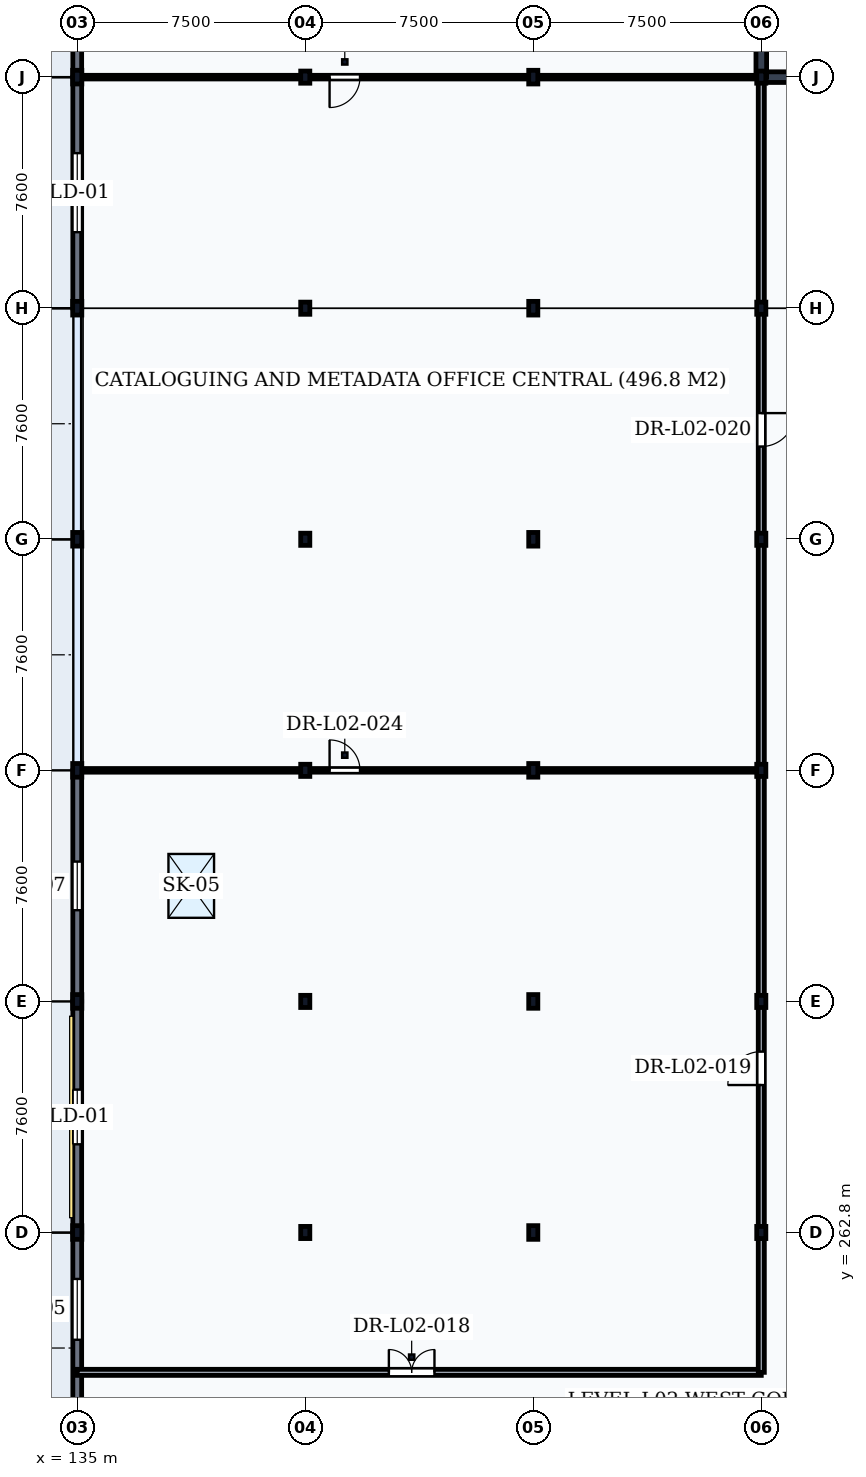
"""IFC4 building model, lengths in metres.
Left out: names, types, materials, properties, quantities, classifications, styles, units other than length and angle.
Written with IfcOpenShell. Run it as: python <this file> out.ifc"""

import sys

from ifc_helpers import new_model, si_unit, direction, frame, frame_2d, origin, origin_2d, place, context, subcontext, project, spatial, rectangle, i_section, extrude, element, fill, save


model = new_model("IFC4")
c1 = context("Model", 3, precision=1e-05, world=origin(), true_north=direction((0.0, 1.0)))
c2 = subcontext(c1, "Body", "Model", "MODEL_VIEW")
j1 = project(units=[si_unit("LENGTHUNIT", "METRE"), si_unit("PLANEANGLEUNIT", "RADIAN")], contexts=[c1])
p1 = place(None, origin())
s1 = spatial("IfcSite", under=j1, at=p1, CompositionType="ELEMENT")
p2 = place(p1, origin())
s2 = spatial("IfcBuilding", under=s1, at=p2, CompositionType="ELEMENT")
p3 = place(p2, frame((0.0, 0.0, 5.4)))
s3 = spatial("IfcBuildingStorey", under=s2, at=p3, CompositionType="ELEMENT", Elevation=5.4)
for number, where, z_axis, x_axis in (
    (1, (135.0, 262.8, 0.0), (0.0, 0.0, 1.0), (1.0, 0.0, 0.0)),
    (2, (135.0, 270.4, 0.0), (0.0, 0.0, 1.0), (1.0, 0.0, 0.0)),
    (3, (135.0, 278.0, 0.0), (0.0, 0.0, 1.0), (1.0, 0.0, 0.0)),
    (4, (135.0, 285.6, 0.0), (0.0, 0.0, 1.0), (1.0, 0.0, 0.0)),
    (5, (135.0, 293.2, 0.0), (0.0, 0.0, 1.0), (1.0, 0.0, 0.0)),
    (6, (135.0, 300.8, 0.0), (0.0, 0.0, 1.0), (1.0, 0.0, 0.0)),
):
    element("IfcColumn", number, at=place(p3, frame(where, z_axis=z_axis, x_axis=x_axis)), inside=s3, PredefinedType="COLUMN", context=c2, shape_type="SweptSolid", body=[
        extrude(i_section(OverallWidth=0.3, OverallDepth=0.45, WebThickness=0.014, FlangeThickness=0.026, FilletRadius=0.027, at=origin_2d()), origin(), (0.0, 0.0, 1.0), 5.1),
    ])
for number, where, z_axis, x_axis in (
    (7, (142.5, 262.8, 0.0), (0.0, 0.0, 1.0), (1.0, 0.0, 0.0)),
    (8, (142.5, 270.4, 0.0), (0.0, 0.0, 1.0), (1.0, 0.0, 0.0)),
    (9, (142.5, 278.0, 0.0), (0.0, 0.0, 1.0), (1.0, 0.0, 0.0)),
    (10, (142.5, 285.6, 0.0), (0.0, 0.0, 1.0), (1.0, 0.0, 0.0)),
    (11, (142.5, 293.2, 0.0), (0.0, 0.0, 1.0), (1.0, 0.0, 0.0)),
    (12, (142.5, 300.8, 0.0), (0.0, 0.0, 1.0), (1.0, 0.0, 0.0)),
):
    element("IfcColumn", number, at=place(p3, frame(where, z_axis=z_axis, x_axis=x_axis)), inside=s3, PredefinedType="COLUMN", context=c2, shape_type="SweptSolid", body=[
        extrude(i_section(OverallWidth=0.3, OverallDepth=0.4, WebThickness=0.013, FlangeThickness=0.024, FilletRadius=0.027, at=origin_2d()), origin(), (0.0, 0.0, 1.0), 5.1),
    ])
for number, where, z_axis, x_axis in (
    (13, (150.0, 262.8, 0.0), (0.0, 0.0, 1.0), (1.0, 0.0, 0.0)),
    (14, (150.0, 270.4, 0.0), (0.0, 0.0, 1.0), (1.0, 0.0, 0.0)),
    (15, (150.0, 278.0, 0.0), (0.0, 0.0, 1.0), (1.0, 0.0, 0.0)),
    (16, (150.0, 285.6, 0.0), (0.0, 0.0, 1.0), (1.0, 0.0, 0.0)),
    (17, (150.0, 293.2, 0.0), (0.0, 0.0, 1.0), (1.0, 0.0, 0.0)),
    (18, (150.0, 300.8, 0.0), (0.0, 0.0, 1.0), (1.0, 0.0, 0.0)),
):
    element("IfcColumn", number, at=place(p3, frame(where, z_axis=z_axis, x_axis=x_axis)), inside=s3, PredefinedType="COLUMN", context=c2, shape_type="SweptSolid", body=[
        extrude(i_section(OverallWidth=0.3, OverallDepth=0.45, WebThickness=0.014, FlangeThickness=0.026, FilletRadius=0.027, at=origin_2d()), origin(), (0.0, 0.0, 1.0), 5.1),
    ])
for number, where, z_axis, x_axis in (
    (19, (157.5, 262.8, 0.0), (0.0, 0.0, 1.0), (1.0, 0.0, 0.0)),
    (20, (157.5, 270.4, 0.0), (0.0, 0.0, 1.0), (1.0, 0.0, 0.0)),
    (21, (157.5, 278.0, 0.0), (0.0, 0.0, 1.0), (1.0, 0.0, 0.0)),
    (22, (157.5, 285.6, 0.0), (0.0, 0.0, 1.0), (1.0, 0.0, 0.0)),
    (23, (157.5, 293.2, 0.0), (0.0, 0.0, 1.0), (1.0, 0.0, 0.0)),
    (24, (157.5, 300.8, 0.0), (0.0, 0.0, 1.0), (1.0, 0.0, 0.0)),
):
    element("IfcColumn", number, at=place(p3, frame(where, z_axis=z_axis, x_axis=x_axis)), inside=s3, PredefinedType="COLUMN", context=c2, shape_type="SweptSolid", body=[
        extrude(i_section(OverallWidth=0.3, OverallDepth=0.4, WebThickness=0.013, FlangeThickness=0.024, FilletRadius=0.027, at=origin_2d()), origin(), (0.0, 0.0, 1.0), 5.1),
    ])
p4 = place(p3, frame((135.0, 255.206, 0.0), z_axis=(0.0, 0.0, 1.0), x_axis=(0.0, 1.0, 0.0)))
e25 = element("IfcWall", 25, at=p4, inside=s3, PredefinedType="SOLIDWALL", context=c2, shape_type="SweptSolid", body=[
    extrude(rectangle(XDim=7.588, YDim=0.29, at=frame_2d((3.794, 0.0))), origin(), (0.0, 0.0, 1.0), 4.578),
])
p5 = place(p4, frame((4.066, 0.0, 0.95)))
e26 = element("IfcOpeningElement", 26, at=p5, cuts=e25, PredefinedType="OPENING", context=c2, shape_type="SweptSolid", body=[
    extrude(rectangle(XDim=2.0, YDim=2.6, at=frame_2d((1.0, 1.3))), frame((0.0, 0.16, 0.0), z_axis=(0.0, -1.0, 0.0), x_axis=(1.0, 0.0, 0.0)), (0.0, 0.0, 1.0), 0.32),
])
p6 = place(p3, frame((135.0, 262.806, 0.0), z_axis=(0.0, 0.0, 1.0), x_axis=(0.0, 1.0, 0.0)))
e27 = element("IfcWall", 27, at=p6, inside=s3, PredefinedType="SOLIDWALL", context=c2, shape_type="SweptSolid", body=[
    extrude(rectangle(XDim=7.588, YDim=0.29, at=frame_2d((3.794, 0.0))), origin(), (0.0, 0.0, 1.0), 4.578),
])
p7 = place(p6, frame((2.894, 0.0, 0.95)))
e28 = element("IfcOpeningElement", 28, at=p7, cuts=e27, PredefinedType="OPENING", context=c2, shape_type="SweptSolid", body=[
    extrude(rectangle(XDim=1.8, YDim=2.6, at=frame_2d((0.9, 1.3))), frame((0.0, 0.16, 0.0), z_axis=(0.0, -1.0, 0.0), x_axis=(1.0, 0.0, 0.0)), (0.0, 0.0, 1.0), 0.32),
])
p8 = place(p3, frame((135.0, 270.406, 0.0), z_axis=(0.0, 0.0, 1.0), x_axis=(0.0, 1.0, 0.0)))
e29 = element("IfcWall", 29, at=p8, inside=s3, PredefinedType="SOLIDWALL", context=c2, shape_type="SweptSolid", body=[
    extrude(rectangle(XDim=7.588, YDim=0.29, at=frame_2d((3.794, 0.0))), origin(), (0.0, 0.0, 1.0), 4.578),
])
p9 = place(p8, frame((2.994, 0.0, 0.95)))
e30 = element("IfcOpeningElement", 30, at=p9, cuts=e29, PredefinedType="OPENING", context=c2, shape_type="SweptSolid", body=[
    extrude(rectangle(XDim=1.6, YDim=2.4, at=frame_2d((0.8, 1.2))), frame((0.0, 0.16, 0.0), z_axis=(0.0, -1.0, 0.0), x_axis=(1.0, 0.0, 0.0)), (0.0, 0.0, 1.0), 0.32),
])
p10 = place(p3, frame((135.0, 293.206, 0.0), z_axis=(0.0, 0.0, 1.0), x_axis=(0.0, 1.0, 0.0)))
e31 = element("IfcWall", 31, at=p10, inside=s3, PredefinedType="SOLIDWALL", context=c2, shape_type="SweptSolid", body=[
    extrude(rectangle(XDim=7.588, YDim=0.29, at=frame_2d((3.794, 0.0))), origin(), (0.0, 0.0, 1.0), 4.578),
])
p11 = place(p10, frame((2.494, 0.0, 0.95)))
e32 = element("IfcOpeningElement", 32, at=p11, cuts=e31, PredefinedType="OPENING", context=c2, shape_type="SweptSolid", body=[
    extrude(rectangle(XDim=2.6, YDim=3.0, at=frame_2d((1.3, 1.5))), frame((0.0, 0.16, 0.0), z_axis=(0.0, -1.0, 0.0), x_axis=(1.0, 0.0, 0.0)), (0.0, 0.0, 1.0), 0.32),
])
p12 = place(p3, frame((135.0, 300.806, 0.0), z_axis=(0.0, 0.0, 1.0), x_axis=(0.0, 1.0, 0.0)))
e33 = element("IfcWall", 33, at=p12, inside=s3, PredefinedType="SOLIDWALL", context=c2, shape_type="SweptSolid", body=[
    extrude(rectangle(XDim=7.588, YDim=0.29, at=frame_2d((3.794, 0.0))), origin(), (0.0, 0.0, 1.0), 4.578),
])
p13 = place(p12, frame((2.594, 0.0, 0.95)))
e34 = element("IfcOpeningElement", 34, at=p13, cuts=e33, PredefinedType="OPENING", context=c2, shape_type="SweptSolid", body=[
    extrude(rectangle(XDim=2.4, YDim=2.8, at=frame_2d((1.2, 1.4))), frame((0.0, 0.16, 0.0), z_axis=(0.0, -1.0, 0.0), x_axis=(1.0, 0.0, 0.0)), (0.0, 0.0, 1.0), 0.32),
])
p14 = place(p3, frame((135.1, 248.6, 5.1), z_axis=(0.0, 0.0, 1.0), x_axis=(0.0, 1.0, 0.0)))
e35 = element("IfcWall", 35, at=p14, inside=s3, PredefinedType="PARAPET", context=c2, shape_type="SweptSolid", body=[
    extrude(rectangle(XDim=89.2, YDim=0.18, at=frame_2d((44.6, 0.0))), origin(), (0.0, 0.0, 1.0), 1.2),
])
p15 = place(p3, frame((157.5, 300.8, 0.0), z_axis=(0.0, 0.0, 1.0), x_axis=(1.0, 0.0, 0.0)))
e36 = element("IfcWall", 36, at=p15, inside=s3, PredefinedType="SHEAR", context=c2, shape_type="SweptSolid", body=[
    extrude(rectangle(XDim=7.5, YDim=0.35, at=frame_2d((3.75, 0.0))), origin(), (0.0, 0.0, 1.0), 4.86),
])
p16 = place(p3, frame((157.5, 300.8, 0.0), z_axis=(0.0, 0.0, 1.0), x_axis=(0.0, 1.0, 0.0)))
e37 = element("IfcWall", 37, at=p16, inside=s3, PredefinedType="SHEAR", context=c2, shape_type="SweptSolid", body=[
    extrude(rectangle(XDim=7.6, YDim=0.35, at=frame_2d((3.8, 0.0))), origin(), (0.0, 0.0, 1.0), 4.86),
])
p17 = place(p3, frame((135.0, 258.2, 0.0), z_axis=(0.0, 0.0, 1.0), x_axis=(1.0, 0.0, 0.0)))
e38 = element("IfcWall", 38, at=p17, inside=s3, PredefinedType="PARTITIONING", context=c2, shape_type="SweptSolid", body=[
    extrude(rectangle(XDim=22.5, YDim=0.2, at=frame_2d((11.25, 0.0))), origin(), (0.0, 0.0, 1.0), 4.85),
])
p18 = place(p17, frame((10.25, 0.0, 0.0)))
e39 = element("IfcOpeningElement", 39, at=p18, cuts=e38, PredefinedType="OPENING", context=c2, shape_type="SweptSolid", body=[
    extrude(rectangle(XDim=1.5, YDim=2.25, at=frame_2d((0.75, 1.125))), frame((0.0, 0.115, 0.0), z_axis=(0.0, -1.0, 0.0), x_axis=(1.0, 0.0, 0.0)), (0.0, 0.0, 1.0), 0.23),
])
p19 = place(p3, frame((157.5, 258.2, 0.0), z_axis=(0.0, 0.0, 1.0), x_axis=(0.0, 1.0, 0.0)))
e40 = element("IfcWall", 40, at=p19, inside=s3, PredefinedType="PARTITIONING", context=c2, shape_type="SweptSolid", body=[
    extrude(rectangle(XDim=42.6, YDim=0.2, at=frame_2d((21.3, 0.0))), origin(), (0.0, 0.0, 1.0), 4.498),
])
p20 = place(p19, frame((9.45, 0.0, 0.0)))
e41 = element("IfcOpeningElement", 41, at=p20, cuts=e40, PredefinedType="OPENING", context=c2, shape_type="SweptSolid", body=[
    extrude(rectangle(XDim=1.1, YDim=2.1, at=frame_2d((0.55, 1.05))), frame((0.0, 0.115, 0.0), z_axis=(0.0, -1.0, 0.0), x_axis=(1.0, 0.0, 0.0)), (0.0, 0.0, 1.0), 0.23),
])
p21 = place(p19, frame((30.45, 0.0, 0.0)))
e42 = element("IfcOpeningElement", 42, at=p21, cuts=e40, PredefinedType="OPENING", context=c2, shape_type="SweptSolid", body=[
    extrude(rectangle(XDim=1.1, YDim=2.1, at=frame_2d((0.55, 1.05))), frame((0.0, 0.115, 0.0), z_axis=(0.0, -1.0, 0.0), x_axis=(1.0, 0.0, 0.0)), (0.0, 0.0, 1.0), 0.23),
])
p22 = place(p3, frame((135.0, 278.0, 0.0), z_axis=(0.0, 0.0, 1.0), x_axis=(1.0, 0.0, 0.0)))
e43 = element("IfcWall", 43, at=p22, inside=s3, PredefinedType="PARTITIONING", context=c2, shape_type="SweptSolid", body=[
    extrude(rectangle(XDim=22.5, YDim=0.12, at=frame_2d((11.25, 0.0))), origin(), (0.0, 0.0, 1.0), 4.488),
])
p23 = place(p22, frame((8.3, 0.0, 0.0)))
e44 = element("IfcOpeningElement", 44, at=p23, cuts=e43, PredefinedType="OPENING", context=c2, shape_type="SweptSolid", body=[
    extrude(rectangle(XDim=1.0, YDim=2.1, at=frame_2d((0.5, 1.05))), frame((0.0, 0.075, 0.0), z_axis=(0.0, -1.0, 0.0), x_axis=(1.0, 0.0, 0.0)), (0.0, 0.0, 1.0), 0.15),
])
p24 = place(p3, frame((135.0, 300.8, 0.0), z_axis=(0.0, 0.0, 1.0), x_axis=(1.0, 0.0, 0.0)))
e45 = element("IfcWall", 45, at=p24, inside=s3, PredefinedType="PARTITIONING", context=c2, shape_type="SweptSolid", body=[
    extrude(rectangle(XDim=22.5, YDim=0.12, at=frame_2d((11.25, 0.0))), origin(), (0.0, 0.0, 1.0), 4.488),
])
p25 = place(p24, frame((8.3, 0.0, 0.0)))
e46 = element("IfcOpeningElement", 46, at=p25, cuts=e45, PredefinedType="OPENING", context=c2, shape_type="SweptSolid", body=[
    extrude(rectangle(XDim=1.0, YDim=2.1, at=frame_2d((0.5, 1.05))), frame((0.0, 0.075, 0.0), z_axis=(0.0, -1.0, 0.0), x_axis=(1.0, 0.0, 0.0)), (0.0, 0.0, 1.0), 0.15),
])
p26 = place(p5, origin())
e47 = element("IfcWindow", 47, at=p26, inside=s3, PartitioningType="DOUBLE_PANEL_VERTICAL", PredefinedType="WINDOW", context=c2, shape_type="SweptSolid", body=[
    extrude(rectangle(XDim=2.0, YDim=2.6, at=frame_2d((1.0, 1.3))), frame((0.0, 0.03, 0.0), z_axis=(0.0, -1.0, 0.0), x_axis=(1.0, 0.0, 0.0)), (0.0, 0.0, 1.0), 0.06),
])
fill(e26, e47)
p27 = place(p7, origin())
e48 = element("IfcWindow", 48, at=p27, inside=s3, PartitioningType="DOUBLE_PANEL_VERTICAL", PredefinedType="WINDOW", context=c2, shape_type="SweptSolid", body=[
    extrude(rectangle(XDim=1.8, YDim=2.6, at=frame_2d((0.9, 1.3))), frame((0.0, 0.03, 0.0), z_axis=(0.0, -1.0, 0.0), x_axis=(1.0, 0.0, 0.0)), (0.0, 0.0, 1.0), 0.06),
])
fill(e28, e48)
p28 = place(p9, origin())
e49 = element("IfcWindow", 49, at=p28, inside=s3, PartitioningType="SINGLE_PANEL", PredefinedType="WINDOW", context=c2, shape_type="SweptSolid", body=[
    extrude(rectangle(XDim=1.6, YDim=2.4, at=frame_2d((0.8, 1.2))), frame((0.0, 0.03, 0.0), z_axis=(0.0, -1.0, 0.0), x_axis=(1.0, 0.0, 0.0)), (0.0, 0.0, 1.0), 0.06),
])
fill(e30, e49)
p29 = place(p11, origin())
e50 = element("IfcWindow", 50, at=p29, inside=s3, PartitioningType="DOUBLE_PANEL_VERTICAL", PredefinedType="WINDOW", context=c2, shape_type="SweptSolid", body=[
    extrude(rectangle(XDim=2.6, YDim=3.0, at=frame_2d((1.3, 1.5))), frame((0.0, 0.03, 0.0), z_axis=(0.0, -1.0, 0.0), x_axis=(1.0, 0.0, 0.0)), (0.0, 0.0, 1.0), 0.06),
])
fill(e32, e50)
p30 = place(p2, frame((0.0, 0.0, 10.5)))
p31 = place(p30, frame((0.0, 0.0, -0.25)))
p32 = place(p31, frame((138.75, 274.2, -0.01)))
p33 = place(p32, frame((0.0, 0.0, 0.21)))
e51 = element("IfcWindow", 51, at=p33, inside=s3, PartitioningType="SINGLE_PANEL", PredefinedType="SKYLIGHT", context=c2, shape_type="SweptSolid", body=[
    extrude(rectangle(XDim=1.5, YDim=2.1, at=origin_2d()), origin(), (0.0, 0.0, 1.0), 0.05),
])
p34 = place(p18, origin())
e52 = element("IfcDoor", 52, at=p34, inside=s3, OperationType="DOUBLE_DOOR_SINGLE_SWING", PredefinedType="DOOR", context=c2, shape_type="SweptSolid", body=[
    extrude(rectangle(XDim=1.5, YDim=2.25, at=frame_2d((0.75, 1.125))), frame((0.0, 0.025, 0.0), z_axis=(0.0, -1.0, 0.0), x_axis=(1.0, 0.0, 0.0)), (0.0, 0.0, 1.0), 0.05),
])
fill(e39, e52)
p35 = place(p20, origin())
e53 = element("IfcDoor", 53, at=p35, inside=s3, OperationType="SINGLE_SWING_LEFT", PredefinedType="DOOR", context=c2, shape_type="SweptSolid", body=[
    extrude(rectangle(XDim=1.1, YDim=2.1, at=frame_2d((0.55, 1.05))), frame((0.0, 0.025, 0.0), z_axis=(0.0, -1.0, 0.0), x_axis=(1.0, 0.0, 0.0)), (0.0, 0.0, 1.0), 0.05),
])
fill(e41, e53)
p36 = place(p21, origin())
e54 = element("IfcDoor", 54, at=p36, inside=s3, OperationType="SINGLE_SWING_RIGHT", PredefinedType="DOOR", context=c2, shape_type="SweptSolid", body=[
    extrude(rectangle(XDim=1.1, YDim=2.1, at=frame_2d((0.55, 1.05))), frame((0.0, 0.025, 0.0), z_axis=(0.0, -1.0, 0.0), x_axis=(1.0, 0.0, 0.0)), (0.0, 0.0, 1.0), 0.05),
])
fill(e42, e54)
p37 = place(p23, origin())
e55 = element("IfcDoor", 55, at=p37, inside=s3, OperationType="SINGLE_SWING_LEFT", PredefinedType="DOOR", context=c2, shape_type="SweptSolid", body=[
    extrude(rectangle(XDim=1.0, YDim=2.1, at=frame_2d((0.5, 1.05))), frame((0.0, 0.025, 0.0), z_axis=(0.0, -1.0, 0.0), x_axis=(1.0, 0.0, 0.0)), (0.0, 0.0, 1.0), 0.05),
])
fill(e44, e55)
p38 = place(p25, frame((1.0, 0.0, 0.0), z_axis=(0.0, 0.0, 1.0), x_axis=(-1.0, 0.0, 0.0)))
e56 = element("IfcDoor", 56, at=p38, inside=s3, OperationType="SINGLE_SWING_RIGHT", PredefinedType="DOOR", context=c2, shape_type="SweptSolid", body=[
    extrude(rectangle(XDim=1.0, YDim=2.1, at=frame_2d((0.5, 1.05))), frame((0.0, 0.025, 0.0), z_axis=(0.0, -1.0, 0.0), x_axis=(1.0, 0.0, 0.0)), (0.0, 0.0, 1.0), 0.05),
])
fill(e46, e56)
save(model, sys.argv[1])
